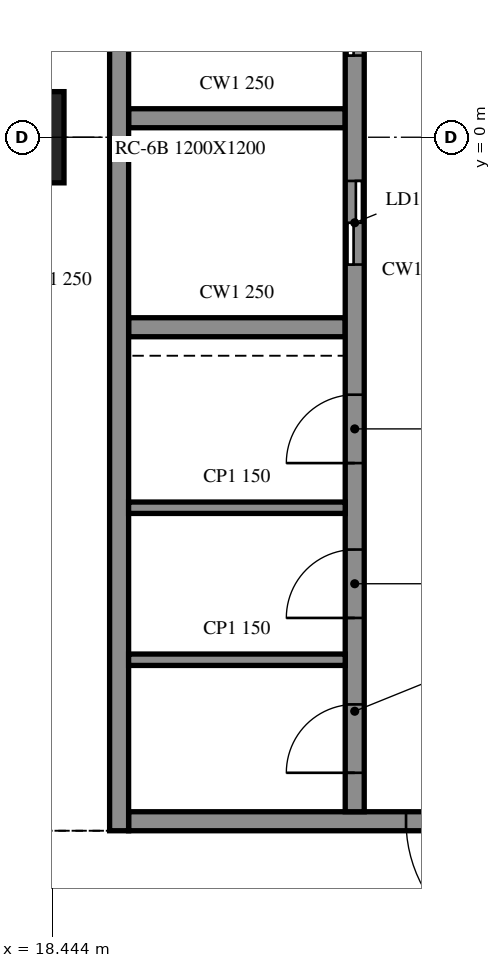
"""IFC4 building model, lengths in metres.
Left out: names, types, materials, properties, quantities, classifications, styles, units other than length and angle.
Written with IfcOpenShell. Run it as: python <this file> out.ifc"""

import sys

from ifc_helpers import new_model, si_unit, direction, frame, frame_2d, origin, origin_2d, place, context, subcontext, project, spatial, rectangle, extrude, element, fill, save


model = new_model("IFC4")
c1 = context("Model", 3, precision=1e-05, world=origin(), true_north=direction((0.0, 1.0)))
c2 = subcontext(c1, "Body", "Model", "MODEL_VIEW")
j1 = project(units=[si_unit("LENGTHUNIT", "METRE"), si_unit("PLANEANGLEUNIT", "RADIAN")], contexts=[c1])
p1 = place(None, origin())
s1 = spatial("IfcSite", under=j1, at=p1, CompositionType="ELEMENT")
p2 = place(p1, origin())
s2 = spatial("IfcBuilding", under=s1, at=p2, CompositionType="ELEMENT")
p3 = place(p2, frame((0.0, 0.0, 189.6)))
s3 = spatial("IfcBuildingStorey", under=s2, at=p3, CompositionType="ELEMENT", Elevation=189.6)
p4 = place(p3, frame((18.0, 0.0, -0.4), z_axis=(0.0, 0.0, 1.0), x_axis=(1.0, 0.0, 0.0)))
e1 = element("IfcColumn", 1, at=p4, inside=s3, PredefinedType="COLUMN", context=c2, shape_type="SweptSolid", body=[
    extrude(rectangle(XDim=1.2, YDim=1.2, at=origin_2d()), origin(), (0.0, 0.0, 1.0), 4.36),
])
p5 = place(p3, frame((19.325, 15.125, 0.0), z_axis=(0.0, 0.0, 1.0), x_axis=(0.0, -1.0, 0.0)))
e2 = element("IfcWall", 2, at=p5, inside=s3, PredefinedType="SOLIDWALL", context=c2, shape_type="SweptSolid", body=[
    extrude(rectangle(XDim=24.25, YDim=0.25, at=frame_2d((12.125, 0.0))), origin(), (0.0, 0.0, 1.0), 3.96),
])
p6 = place(p3, frame((28.55, -9.0, 0.0), z_axis=(0.0, 0.0, 1.0), x_axis=(-1.0, 0.0, 0.0)))
e3 = element("IfcWall", 3, at=p6, inside=s3, PredefinedType="SOLIDWALL", context=c2, shape_type="SweptSolid", body=[
    extrude(rectangle(XDim=9.1, YDim=0.25, at=frame_2d((4.55, 0.0))), origin(), (0.0, 0.0, 1.0), 3.96),
])
p7 = place(p6, frame((3.65, 0.0, 0.0)))
e4 = element("IfcOpeningElement", 4, at=p7, cuts=e3, PredefinedType="OPENING", context=c2, shape_type="SweptSolid", body=[
    extrude(rectangle(XDim=1.8, YDim=2.1, at=frame_2d((0.9, 1.05))), frame((0.0, 0.135, 0.0), z_axis=(0.0, -1.0, 0.0), x_axis=(1.0, 0.0, 0.0)), (0.0, 0.0, 1.0), 0.27),
])
p8 = place(p3, frame((22.425, -8.875, 0.0), z_axis=(0.0, 0.0, 1.0), x_axis=(0.0, 1.0, 0.0)))
e5 = element("IfcWall", 5, at=p8, inside=s3, PredefinedType="SOLIDWALL", context=c2, shape_type="SweptSolid", body=[
    extrude(rectangle(XDim=17.5, YDim=0.25, at=frame_2d((8.75, 0.0))), origin(), (0.0, 0.0, 1.0), 3.96),
])
p9 = place(p8, frame((7.2, 0.0, 0.0)))
e6 = element("IfcOpeningElement", 6, at=p9, cuts=e5, PredefinedType="OPENING", context=c2, shape_type="SweptSolid", body=[
    extrude(rectangle(XDim=1.1, YDim=2.1, at=frame_2d((0.55, 1.05))), frame((0.0, 0.135, 0.0), z_axis=(0.0, -1.0, 0.0), x_axis=(1.0, 0.0, 0.0)), (0.0, 0.0, 1.0), 0.27),
])
p10 = place(p8, frame((9.95, 0.0, 0.0)))
e7 = element("IfcOpeningElement", 7, at=p10, cuts=e5, PredefinedType="OPENING", context=c2, shape_type="SweptSolid", body=[
    extrude(rectangle(XDim=1.1, YDim=2.1, at=frame_2d((0.55, 1.05))), frame((0.0, 0.135, 0.0), z_axis=(0.0, -1.0, 0.0), x_axis=(1.0, 0.0, 0.0)), (0.0, 0.0, 1.0), 0.27),
])
p11 = place(p8, frame((12.7, 0.0, 0.0)))
e8 = element("IfcOpeningElement", 8, at=p11, cuts=e5, PredefinedType="OPENING", context=c2, shape_type="SweptSolid", body=[
    extrude(rectangle(XDim=1.1, YDim=2.1, at=frame_2d((0.55, 1.05))), frame((0.0, 0.135, 0.0), z_axis=(0.0, -1.0, 0.0), x_axis=(1.0, 0.0, 0.0)), (0.0, 0.0, 1.0), 0.27),
])
p12 = place(p8, frame((15.45, 0.0, 0.0)))
e9 = element("IfcOpeningElement", 9, at=p12, cuts=e5, PredefinedType="OPENING", context=c2, shape_type="SweptSolid", body=[
    extrude(rectangle(XDim=1.1, YDim=2.1, at=frame_2d((0.55, 1.05))), frame((0.0, 0.135, 0.0), z_axis=(0.0, -1.0, 0.0), x_axis=(1.0, 0.0, 0.0)), (0.0, 0.0, 1.0), 0.27),
])
p13 = place(p8, frame((0.512, 0.0, 0.0)))
e10 = element("IfcOpeningElement", 10, at=p13, cuts=e5, PredefinedType="OPENING", context=c2, shape_type="SweptSolid", body=[
    extrude(rectangle(XDim=0.9, YDim=2.1, at=frame_2d((0.45, 1.05))), frame((0.0, 0.135, 0.0), z_axis=(0.0, -1.0, 0.0), x_axis=(1.0, 0.0, 0.0)), (0.0, 0.0, 1.0), 0.27),
])
p14 = place(p8, frame((2.55, 0.0, 0.0)))
e11 = element("IfcOpeningElement", 11, at=p14, cuts=e5, PredefinedType="OPENING", context=c2, shape_type="SweptSolid", body=[
    extrude(rectangle(XDim=0.9, YDim=2.1, at=frame_2d((0.45, 1.05))), frame((0.0, 0.135, 0.0), z_axis=(0.0, -1.0, 0.0), x_axis=(1.0, 0.0, 0.0)), (0.0, 0.0, 1.0), 0.27),
])
p15 = place(p8, frame((4.587, 0.0, 0.0)))
e12 = element("IfcOpeningElement", 12, at=p15, cuts=e5, PredefinedType="OPENING", context=c2, shape_type="SweptSolid", body=[
    extrude(rectangle(XDim=0.9, YDim=2.1, at=frame_2d((0.45, 1.05))), frame((0.0, 0.135, 0.0), z_axis=(0.0, -1.0, 0.0), x_axis=(1.0, 0.0, 0.0)), (0.0, 0.0, 1.0), 0.27),
])
for number, where, z_axis, x_axis in (
    (13, (19.45, -2.5, 0.0), (0.0, 0.0, 1.0), (1.0, 0.0, 0.0)),
    (14, (19.45, 0.25, 0.0), (0.0, 0.0, 1.0), (1.0, 0.0, 0.0)),
):
    element("IfcWall", number, at=place(p3, frame(where, z_axis=z_axis, x_axis=x_axis)), inside=s3, PredefinedType="SOLIDWALL", context=c2, shape_type="SweptSolid", body=[
        extrude(rectangle(XDim=2.85, YDim=0.25, at=frame_2d((1.425, 0.0))), origin(), (0.0, 0.0, 1.0), 3.96),
    ])
for number, where, z_axis, x_axis in (
    (15, (19.45, -6.875, 0.0), (0.0, 0.0, 1.0), (1.0, 0.0, 0.0)),
    (16, (19.45, -4.875, 0.0), (0.0, 0.0, 1.0), (1.0, 0.0, 0.0)),
):
    element("IfcWall", number, at=place(p3, frame(where, z_axis=z_axis, x_axis=x_axis)), inside=s3, PredefinedType="PARTITIONING", context=c2, shape_type="SweptSolid", body=[
        extrude(rectangle(XDim=2.85, YDim=0.15, at=frame_2d((1.425, 0.0))), origin(), (0.0, 0.0, 1.0), 3.96),
    ])
p16 = place(p7, origin())
e17 = element("IfcDoor", 17, at=p16, inside=s3, OperationType="DOUBLE_DOOR_SINGLE_SWING", PredefinedType="DOOR", context=c2, shape_type="SweptSolid", body=[
    extrude(rectangle(XDim=1.8, YDim=2.1, at=frame_2d((0.9, 1.05))), frame((0.0, 0.025, 0.0), z_axis=(0.0, -1.0, 0.0), x_axis=(1.0, 0.0, 0.0)), (0.0, 0.0, 1.0), 0.05),
])
fill(e4, e17)
p17 = place(p9, origin())
e18 = element("IfcDoor", 18, at=p17, inside=s3, OperationType="DOUBLE_DOOR_SLIDING", PredefinedType="DOOR", context=c2, shape_type="SweptSolid", body=[
    extrude(rectangle(XDim=1.1, YDim=2.1, at=frame_2d((0.55, 1.05))), frame((0.0, 0.025, 0.0), z_axis=(0.0, -1.0, 0.0), x_axis=(1.0, 0.0, 0.0)), (0.0, 0.0, 1.0), 0.05),
])
fill(e6, e18)
p18 = place(p10, origin())
e19 = element("IfcDoor", 19, at=p18, inside=s3, OperationType="DOUBLE_DOOR_SLIDING", PredefinedType="DOOR", context=c2, shape_type="SweptSolid", body=[
    extrude(rectangle(XDim=1.1, YDim=2.1, at=frame_2d((0.55, 1.05))), frame((0.0, 0.025, 0.0), z_axis=(0.0, -1.0, 0.0), x_axis=(1.0, 0.0, 0.0)), (0.0, 0.0, 1.0), 0.05),
])
fill(e7, e19)
p19 = place(p13, origin())
e20 = element("IfcDoor", 20, at=p19, inside=s3, OperationType="SINGLE_SWING_RIGHT", PredefinedType="DOOR", context=c2, shape_type="SweptSolid", body=[
    extrude(rectangle(XDim=0.9, YDim=2.1, at=frame_2d((0.45, 1.05))), frame((0.0, 0.025, 0.0), z_axis=(0.0, -1.0, 0.0), x_axis=(1.0, 0.0, 0.0)), (0.0, 0.0, 1.0), 0.05),
])
fill(e10, e20)
p20 = place(p14, origin())
e21 = element("IfcDoor", 21, at=p20, inside=s3, OperationType="SINGLE_SWING_LEFT", PredefinedType="DOOR", context=c2, shape_type="SweptSolid", body=[
    extrude(rectangle(XDim=0.9, YDim=2.1, at=frame_2d((0.45, 1.05))), frame((0.0, 0.025, 0.0), z_axis=(0.0, -1.0, 0.0), x_axis=(1.0, 0.0, 0.0)), (0.0, 0.0, 1.0), 0.05),
])
fill(e11, e21)
p21 = place(p15, origin())
e22 = element("IfcDoor", 22, at=p21, inside=s3, OperationType="SINGLE_SWING_RIGHT", PredefinedType="DOOR", context=c2, shape_type="SweptSolid", body=[
    extrude(rectangle(XDim=0.9, YDim=2.1, at=frame_2d((0.45, 1.05))), frame((0.0, 0.025, 0.0), z_axis=(0.0, -1.0, 0.0), x_axis=(1.0, 0.0, 0.0)), (0.0, 0.0, 1.0), 0.05),
])
fill(e12, e22)
save(model, sys.argv[1])
